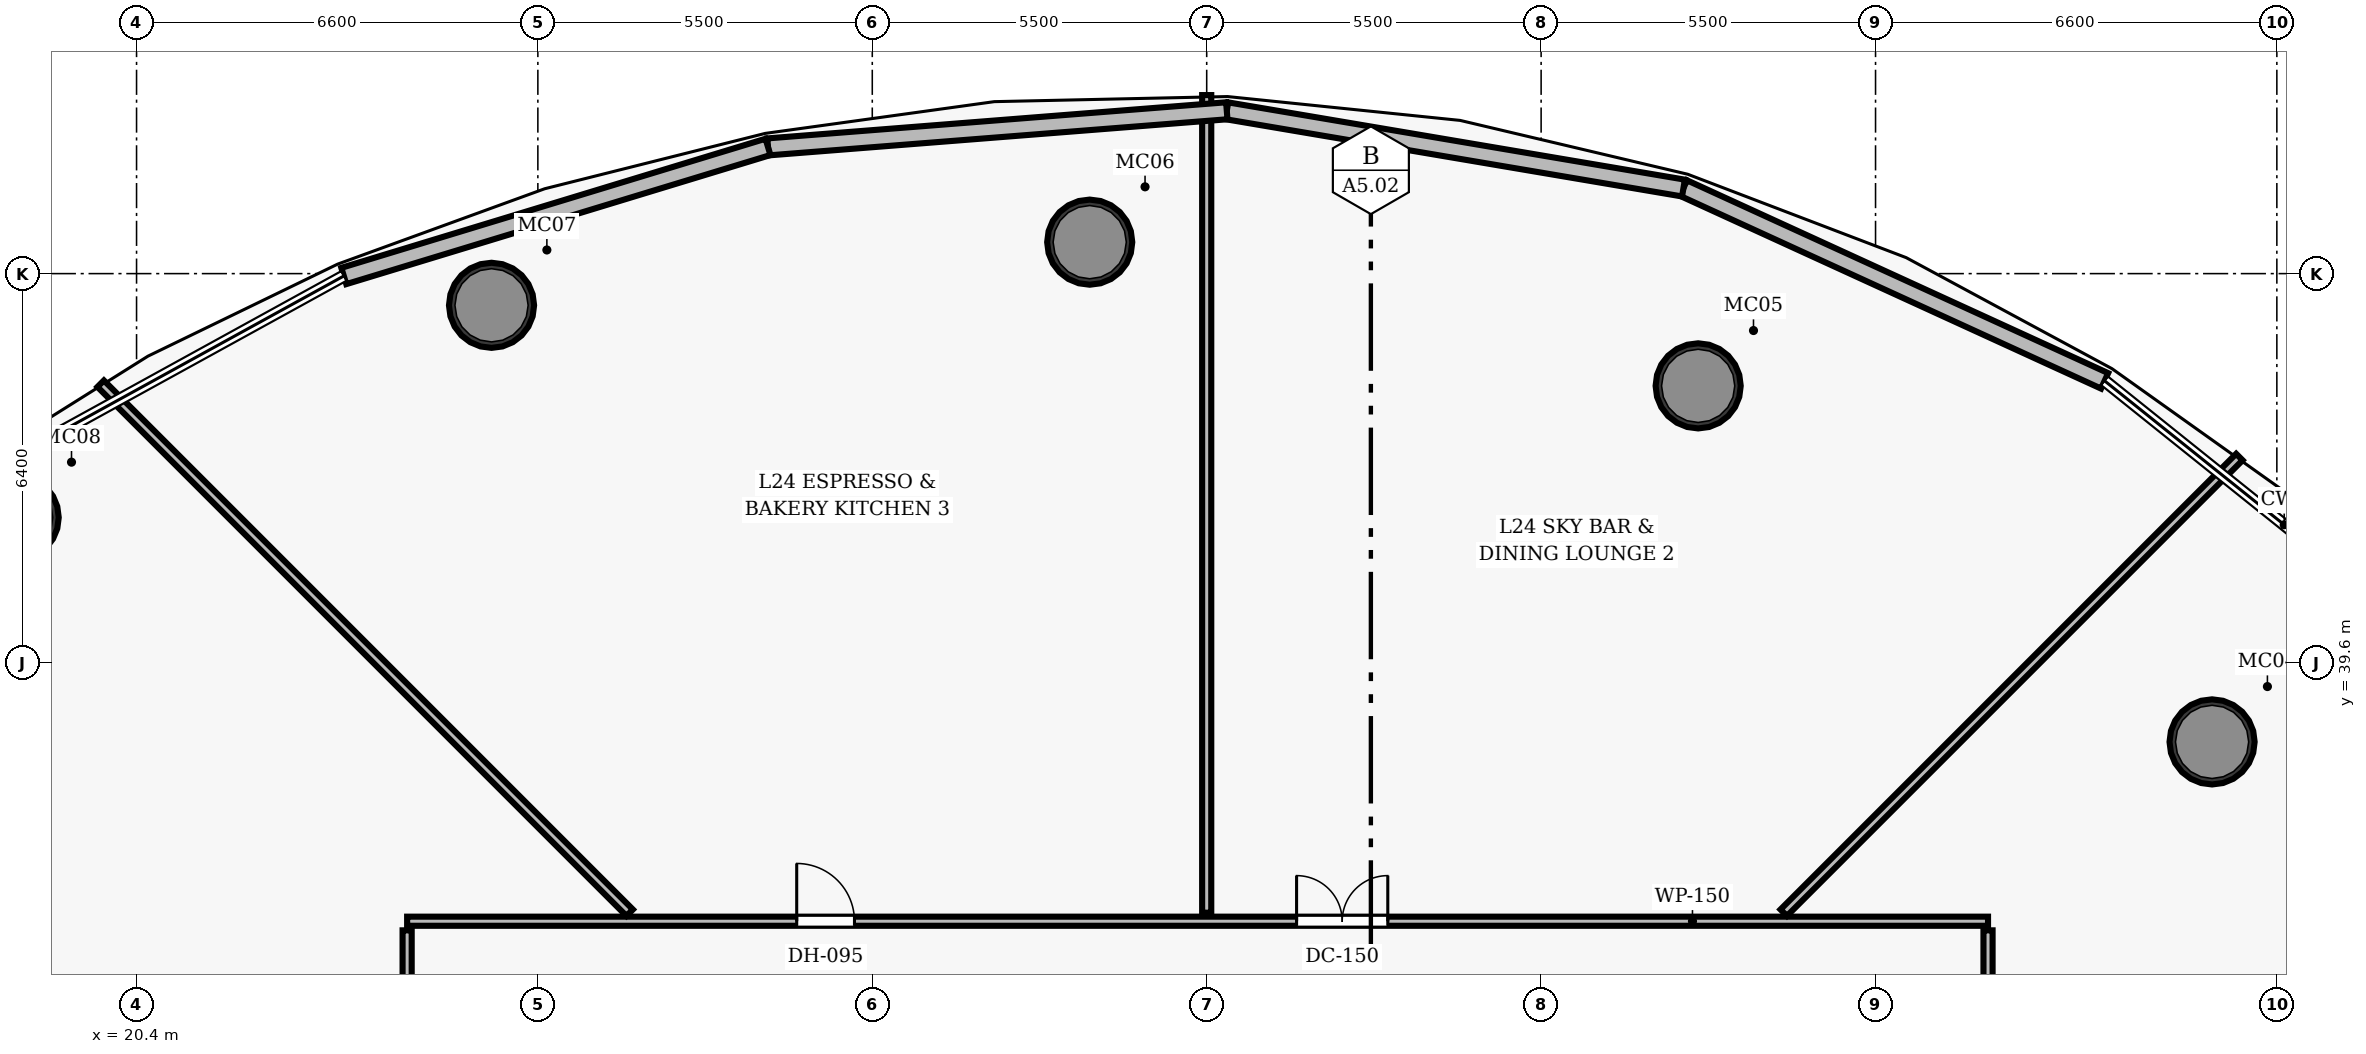
"""IFC4 building model, lengths in metres.
Left out: names, types, materials, properties, quantities, classifications, styles, units other than length and angle.
Written with IfcOpenShell. Run it as: python <this file> out.ifc"""

import sys

from ifc_helpers import new_model, si_unit, direction, frame, frame_2d, origin, origin_2d, place, context, subcontext, project, spatial, rectangle, hollow_circle, extrude, element, fill, save


model = new_model("IFC4")
c1 = context("Model", 3, precision=1e-05, world=origin(), true_north=direction((0.0, 1.0)))
c2 = subcontext(c1, "Body", "Model", "MODEL_VIEW")
j1 = project(units=[si_unit("LENGTHUNIT", "METRE"), si_unit("PLANEANGLEUNIT", "RADIAN")], contexts=[c1])
p1 = place(None, origin())
s1 = spatial("IfcSite", under=j1, at=p1, CompositionType="ELEMENT")
p2 = place(p1, origin())
s2 = spatial("IfcBuilding", under=s1, at=p2, CompositionType="ELEMENT")
p3 = place(p2, frame((0.0, 0.0, 102.8)))
s3 = spatial("IfcBuildingStorey", under=s2, at=p3, CompositionType="ELEMENT", Elevation=102.8)
for number, where, z_axis, x_axis in (
    (1, (54.535, 38.299, 0.0), (0.0, 0.0, 1.0), (1.0, 0.0, 0.0)),
    (2, (46.083, 44.154, 0.0), (0.0, 0.0, 1.0), (1.0, 0.0, 0.0)),
    (3, (36.076, 46.517, 0.0), (0.0, 0.0, 1.0), (1.0, 0.0, 0.0)),
    (4, (26.238, 45.479, 0.0), (0.0, 0.0, 1.0), (1.0, 0.0, 0.0)),
    (5, (18.42, 41.989, 0.0), (0.0, 0.0, 1.0), (1.0, 0.0, 0.0)),
):
    element("IfcColumn", number, at=place(p3, frame(where, z_axis=z_axis, x_axis=x_axis)), inside=s3, PredefinedType="COLUMN", context=c2, shape_type="SweptSolid", body=[
        extrude(hollow_circle(Radius=0.7, WallThickness=0.055, at=origin_2d()), origin(), (0.0, 0.0, 1.0), 3.5),
    ])
p4 = place(p3, frame((24.85, 35.35, 0.0), z_axis=(0.0, 0.0, 1.0), x_axis=(1.0, 0.0, 0.0)))
e6 = element("IfcWall", 6, at=p4, inside=s3, PredefinedType="PARTITIONING", context=c2, shape_type="SweptSolid", body=[
    extrude(rectangle(XDim=26.0, YDim=0.15, at=frame_2d((13.0, 0.0))), origin(), (0.0, 0.0, 1.0), 2.675),
])
p5 = place(p4, frame((14.628, 0.0, 0.0)))
e7 = element("IfcOpeningElement", 7, at=p5, cuts=e6, PredefinedType="OPENING", context=c2, shape_type="SweptSolid", body=[
    extrude(rectangle(XDim=1.5, YDim=2.2, at=frame_2d((0.75, 1.1))), frame((0.0, 0.085, 0.0), z_axis=(0.0, -1.0, 0.0), x_axis=(1.0, 0.0, 0.0)), (0.0, 0.0, 1.0), 0.17),
])
p6 = place(p4, frame((6.407, 0.0, 0.0)))
e8 = element("IfcOpeningElement", 8, at=p6, cuts=e6, PredefinedType="OPENING", context=c2, shape_type="SweptSolid", body=[
    extrude(rectangle(XDim=0.95, YDim=2.15, at=frame_2d((0.475, 1.075))), frame((0.0, 0.085, 0.0), z_axis=(0.0, -1.0, 0.0), x_axis=(1.0, 0.0, 0.0)), (0.0, 0.0, 1.0), 0.17),
])
p7 = place(p3, frame((24.85, 27.08, 0.0), z_axis=(0.0, 0.0, 1.0), x_axis=(0.0, 1.0, 0.0)))
e9 = element("IfcWall", 9, at=p7, inside=s3, PredefinedType="PARTITIONING", context=c2, shape_type="SweptSolid", body=[
    extrude(rectangle(XDim=8.12, YDim=0.15, at=frame_2d((4.06, 0.0))), origin(), (0.0, 0.0, 1.0), 2.675),
])
p8 = place(p7, frame((1.28, 0.0, 0.0)))
e10 = element("IfcOpeningElement", 10, at=p8, cuts=e9, PredefinedType="OPENING", context=c2, shape_type="SweptSolid", body=[
    extrude(rectangle(XDim=1.5, YDim=2.2, at=frame_2d((0.75, 1.1))), frame((0.0, 0.085, 0.0), z_axis=(0.0, -1.0, 0.0), x_axis=(1.0, 0.0, 0.0)), (0.0, 0.0, 1.0), 0.17),
])
p9 = place(p3, frame((50.85, 27.08, 0.0), z_axis=(0.0, 0.0, 1.0), x_axis=(0.0, 1.0, 0.0)))
e11 = element("IfcWall", 11, at=p9, inside=s3, PredefinedType="PARTITIONING", context=c2, shape_type="SweptSolid", body=[
    extrude(rectangle(XDim=8.12, YDim=0.15, at=frame_2d((4.06, 0.0))), origin(), (0.0, 0.0, 1.0), 2.675),
])
p10 = place(p9, frame((1.28, 0.0, 0.0)))
e12 = element("IfcOpeningElement", 12, at=p10, cuts=e11, PredefinedType="OPENING", context=c2, shape_type="SweptSolid", body=[
    extrude(rectangle(XDim=1.5, YDim=2.2, at=frame_2d((0.75, 1.1))), frame((0.0, 0.085, 0.0), z_axis=(0.0, -1.0, 0.0), x_axis=(1.0, 0.0, 0.0)), (0.0, 0.0, 1.0), 0.17),
])
p11 = place(p3, frame((47.49, 35.49, 0.0), z_axis=(0.0, 0.0, 1.0), x_axis=(0.707106781187, 0.707106781187, 0.0)))
e13 = element("IfcWall", 13, at=p11, inside=s3, PredefinedType="PARTITIONING", context=c2, shape_type="SweptSolid", body=[
    extrude(rectangle(XDim=10.598, YDim=0.15, at=frame_2d((5.299, 0.0))), origin(), (0.0, 0.0, 1.0), 2.675),
])
p12 = place(p3, frame((38.0, 35.49, 0.0), z_axis=(0.0, 0.0, 1.0), x_axis=(0.0, 1.0, 0.0)))
e14 = element("IfcWall", 14, at=p12, inside=s3, PredefinedType="PARTITIONING", context=c2, shape_type="SweptSolid", body=[
    extrude(rectangle(XDim=13.446, YDim=0.15, at=frame_2d((6.723, 0.0))), origin(), (0.0, 0.0, 1.0), 2.675),
])
p13 = place(p3, frame((28.51, 35.49, 0.0), z_axis=(0.0, 0.0, 1.0), x_axis=(-0.707106781187, 0.707106781187, 0.0)))
e15 = element("IfcWall", 15, at=p13, inside=s3, PredefinedType="PARTITIONING", context=c2, shape_type="SweptSolid", body=[
    extrude(rectangle(XDim=12.304, YDim=0.15, at=frame_2d((6.152, 0.0))), origin(), (0.0, 0.0, 1.0), 2.675),
])
p14 = place(p3, frame((45.841, 47.407, 0.0), z_axis=(0.0, 0.0, 1.0), x_axis=(0.909252391781, -0.416245225847, 0.0)))
e16 = element("IfcWall", 16, at=p14, inside=s3, PredefinedType="SOLIDWALL", context=c2, shape_type="SweptSolid", body=[
    extrude(rectangle(XDim=7.617, YDim=0.28, at=frame_2d((3.809, 0.0))), origin(), (0.0, 0.0, 1.0), 3.26),
])
p15 = place(p3, frame((38.33, 48.678, 0.0), z_axis=(0.0, 0.0, 1.0), x_axis=(0.985988185143, -0.166815163454, 0.0)))
e17 = element("IfcWall", 17, at=p15, inside=s3, PredefinedType="SOLIDWALL", context=c2, shape_type="SweptSolid", body=[
    extrude(rectangle(XDim=7.618, YDim=0.28, at=frame_2d((3.809, 0.0))), origin(), (0.0, 0.0, 1.0), 3.26),
])
p16 = place(p3, frame((30.785, 48.084, 0.0), z_axis=(0.0, 0.0, 1.0), x_axis=(0.996918427712, 0.078445194169, 0.0)))
e18 = element("IfcWall", 18, at=p16, inside=s3, PredefinedType="SOLIDWALL", context=c2, shape_type="SweptSolid", body=[
    extrude(rectangle(XDim=7.569, YDim=0.28, at=frame_2d((3.785, 0.0))), origin(), (0.0, 0.0, 1.0), 3.26),
])
p17 = place(p3, frame((23.809, 45.961, 0.0), z_axis=(0.0, 0.0, 1.0), x_axis=(0.95668726025, 0.291117649887, 0.0)))
e19 = element("IfcWall", 19, at=p17, inside=s3, PredefinedType="SOLIDWALL", context=c2, shape_type="SweptSolid", body=[
    extrude(rectangle(XDim=7.292, YDim=0.28, at=frame_2d((3.646, 0.0))), origin(), (0.0, 0.0, 1.0), 3.26),
])
p18 = place(p5, origin())
e20 = element("IfcDoor", 20, at=p18, inside=s3, OperationType="DOUBLE_DOOR_SINGLE_SWING", PredefinedType="DOOR", context=c2, shape_type="SweptSolid", body=[
    extrude(rectangle(XDim=1.5, YDim=2.2, at=frame_2d((0.75, 1.1))), frame((0.0, 0.025, 0.0), z_axis=(0.0, -1.0, 0.0), x_axis=(1.0, 0.0, 0.0)), (0.0, 0.0, 1.0), 0.05),
])
fill(e7, e20)
p19 = place(p6, origin())
e21 = element("IfcDoor", 21, at=p19, inside=s3, OperationType="SINGLE_SWING_LEFT", PredefinedType="DOOR", context=c2, shape_type="SweptSolid", body=[
    extrude(rectangle(XDim=0.95, YDim=2.15, at=frame_2d((0.475, 1.075))), frame((0.0, 0.025, 0.0), z_axis=(0.0, -1.0, 0.0), x_axis=(1.0, 0.0, 0.0)), (0.0, 0.0, 1.0), 0.05),
])
fill(e8, e21)
save(model, sys.argv[1])
